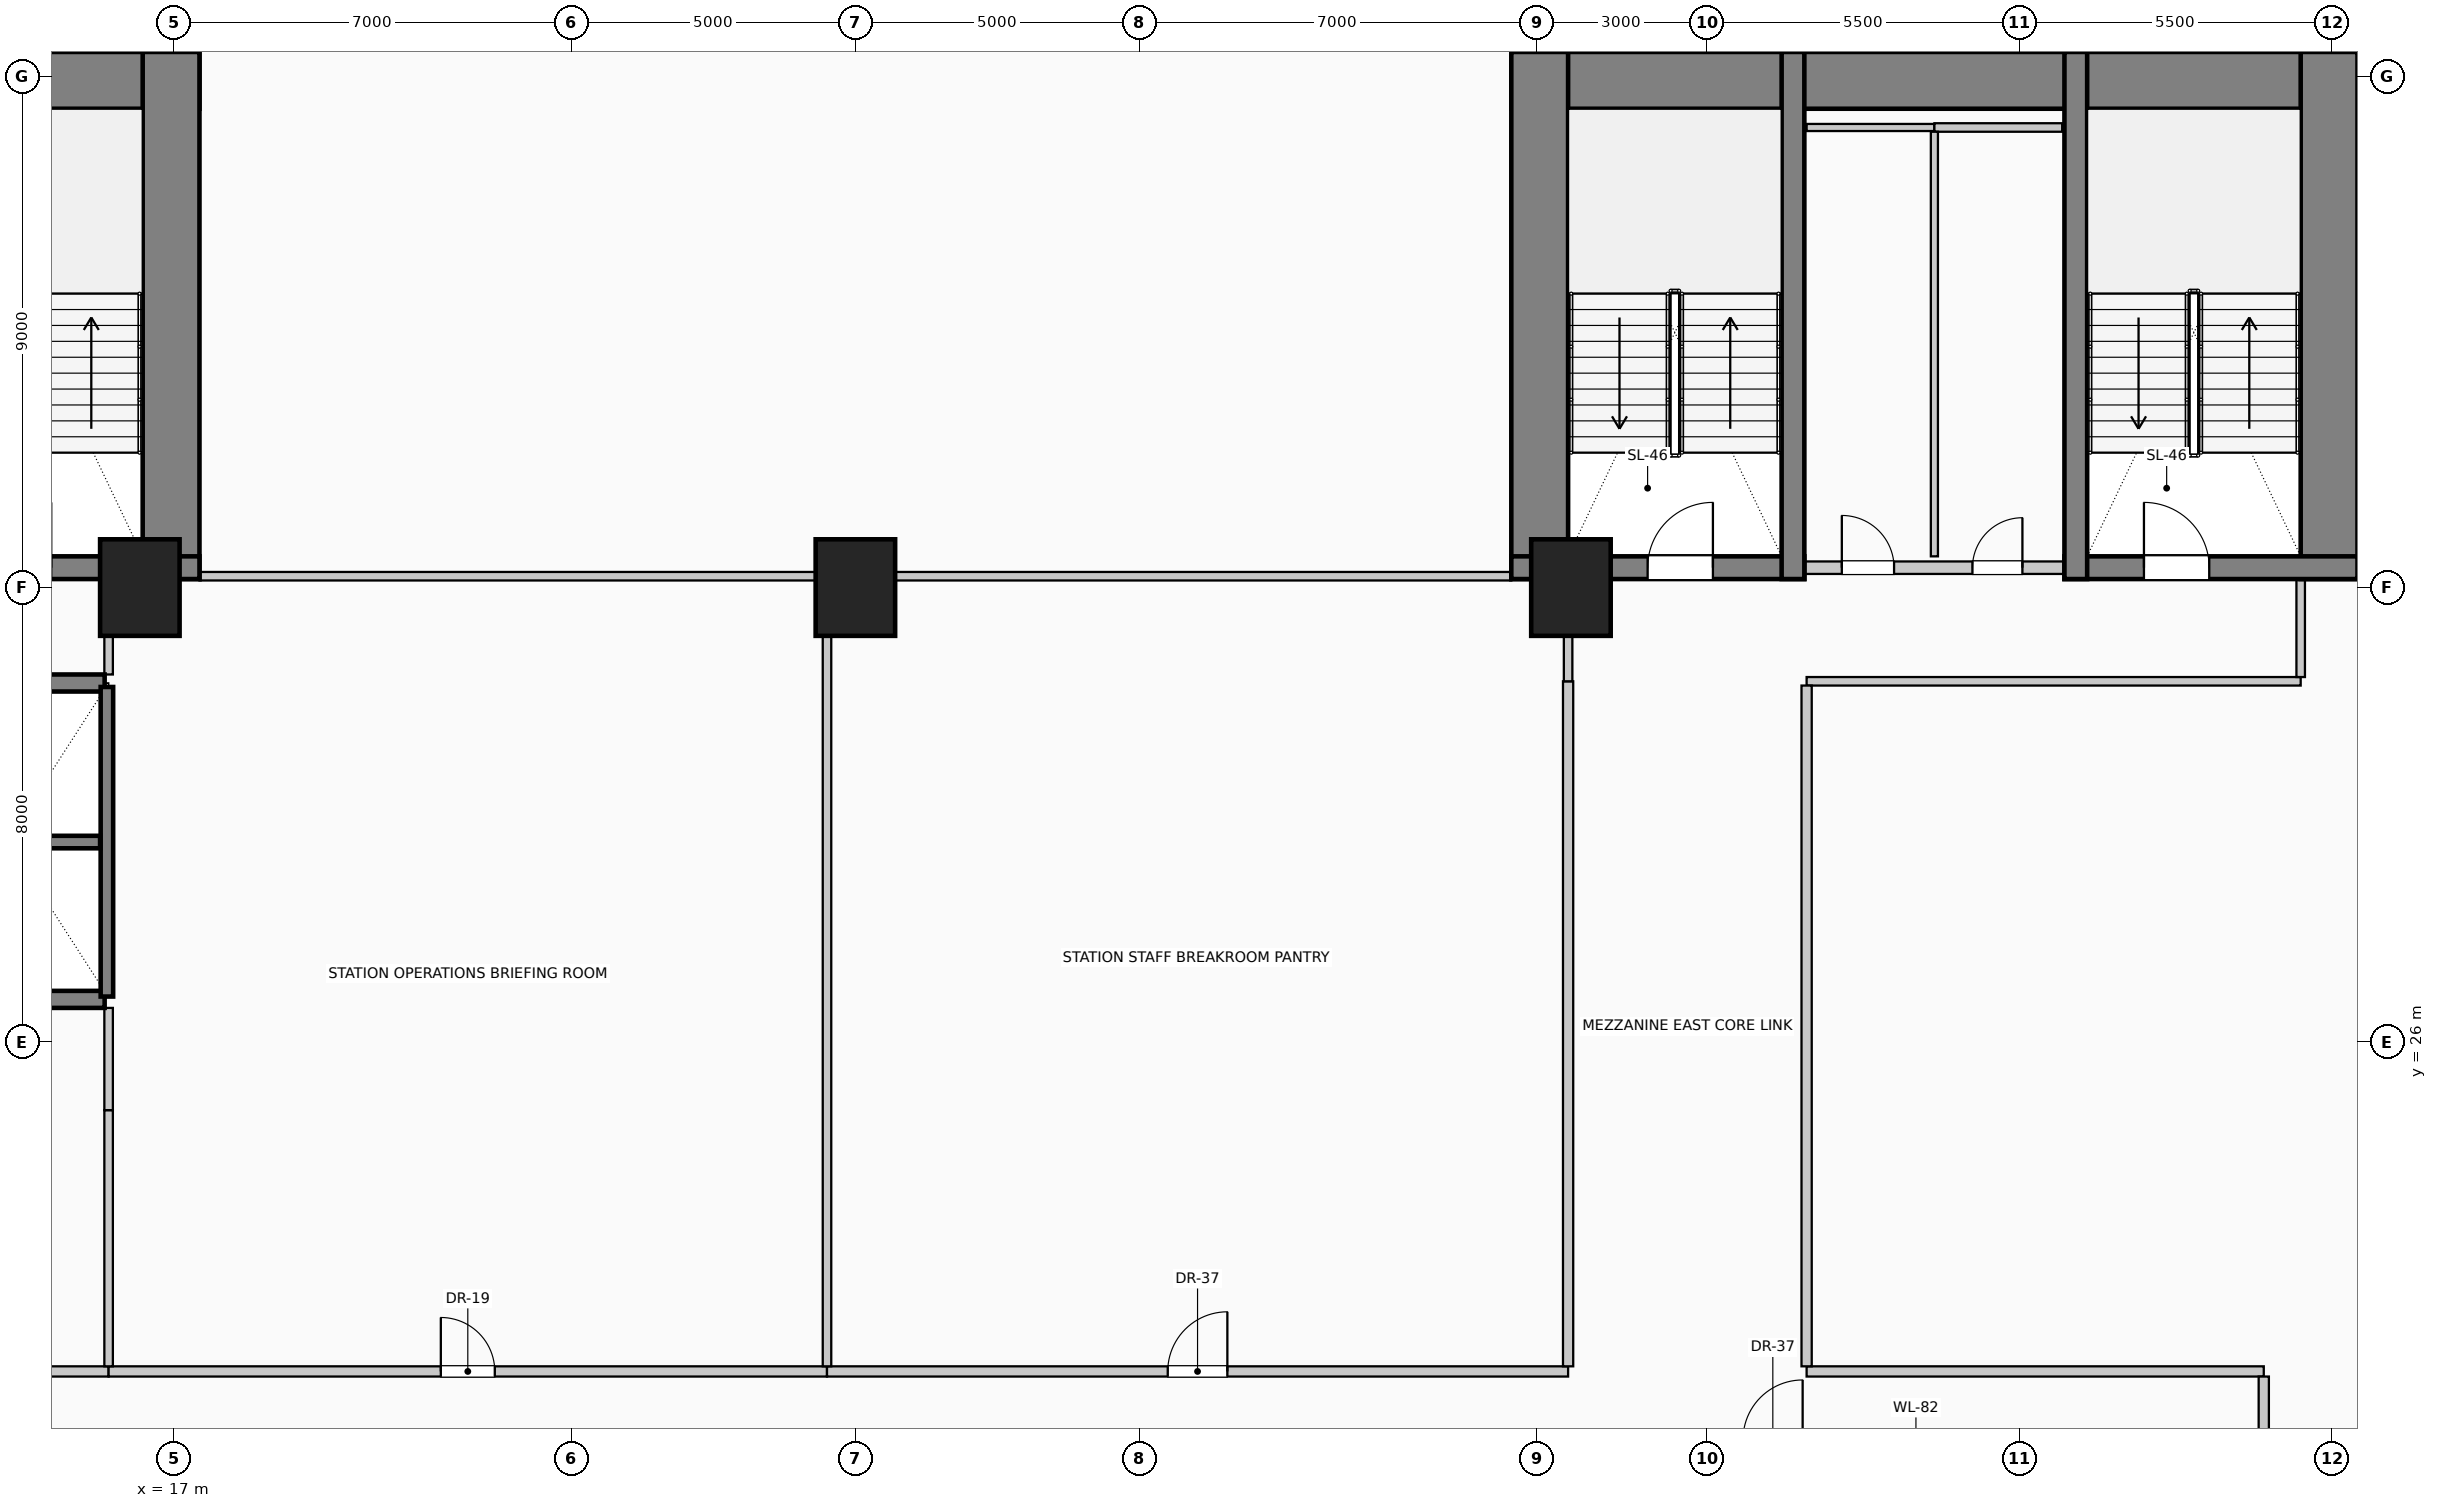
"""IFC4 building model, lengths in metres.
Left out: names, types, materials, properties, quantities, classifications, styles, units other than length and angle.
Written with IfcOpenShell. Run it as: python <this file> out.ifc"""

import sys

from ifc_helpers import new_model, si_unit, direction, frame, frame_2d, origin, origin_2d, place, context, subcontext, project, spatial, rectangle, extrude, element, fill, save


model = new_model("IFC4")
c1 = context("Model", 3, precision=1e-05, world=origin(), true_north=direction((0.0, 1.0)))
c2 = subcontext(c1, "Body", "Model", "MODEL_VIEW")
j1 = project(units=[si_unit("LENGTHUNIT", "METRE"), si_unit("PLANEANGLEUNIT", "RADIAN")], contexts=[c1])
p1 = place(None, origin())
s1 = spatial("IfcSite", under=j1, at=p1, CompositionType="ELEMENT")
p2 = place(p1, origin())
s2 = spatial("IfcBuilding", under=s1, at=p2, CompositionType="ELEMENT")
p3 = place(p2, frame((0.0, 0.0, 9.45)))
s3 = spatial("IfcBuildingStorey", under=s2, at=p3, CompositionType="ELEMENT", Elevation=9.45)
p4 = place(p3, frame((2.55, 42.93, 0.0), z_axis=(0.0, 0.0, 1.0), x_axis=(1.0, 0.0, 0.0)))
e1 = element("IfcWall", 1, at=p4, inside=s3, PredefinedType="SHEAR", context=c2, shape_type="SweptSolid", body=[
    extrude(rectangle(XDim=14.9, YDim=1.0, at=frame_2d((7.45, 0.0))), origin(), (0.0, 0.0, 1.0), 4.05),
])
p5 = place(p3, frame((16.95, 34.15, 0.0), z_axis=(0.0, 0.0, 1.0), x_axis=(0.0, 1.0, 0.0)))
e2 = element("IfcWall", 2, at=p5, inside=s3, PredefinedType="SHEAR", context=c2, shape_type="SweptSolid", body=[
    extrude(rectangle(XDim=9.28, YDim=1.0, at=frame_2d((4.64, 0.0))), origin(), (0.0, 0.0, 1.0), 4.05),
])
p6 = place(p3, frame((12.29, 34.35, 0.0), z_axis=(0.0, 0.0, 1.0), x_axis=(1.0, 0.0, 0.0)))
e3 = element("IfcWall", 3, at=p6, inside=s3, PredefinedType="SHEAR", context=c2, shape_type="SweptSolid", body=[
    extrude(rectangle(XDim=5.16, YDim=0.4, at=frame_2d((2.58, 0.0))), origin(), (0.0, 0.0, 1.0), 4.05),
])
p7 = place(p6, frame((1.4, 0.0, 0.0)))
e4 = element("IfcOpeningElement", 4, at=p7, cuts=e3, PredefinedType="OPENING", context=c2, shape_type="SweptSolid", body=[
    extrude(rectangle(XDim=1.15, YDim=2.2, at=frame_2d((0.575, 1.1))), frame((0.0, 0.21, 0.0), z_axis=(0.0, -1.0, 0.0), x_axis=(1.0, 0.0, 0.0)), (0.0, 0.0, 1.0), 0.42),
])
p8 = place(p3, frame((40.55, 42.93, 0.0), z_axis=(0.0, 0.0, 1.0), x_axis=(1.0, 0.0, 0.0)))
e5 = element("IfcWall", 5, at=p8, inside=s3, PredefinedType="SHEAR", context=c2, shape_type="SweptSolid", body=[
    extrude(rectangle(XDim=14.9, YDim=1.0, at=frame_2d((7.45, 0.0))), origin(), (0.0, 0.0, 1.0), 4.05),
])
for number, where, z_axis, x_axis in (
    (6, (41.05, 34.15, 0.0), (0.0, 0.0, 1.0), (0.0, 1.0, 0.0)),
    (7, (54.95, 34.15, 0.0), (0.0, 0.0, 1.0), (0.0, 1.0, 0.0)),
):
    element("IfcWall", number, at=place(p3, frame(where, z_axis=z_axis, x_axis=x_axis)), inside=s3, PredefinedType="SHEAR", context=c2, shape_type="SweptSolid", body=[
        extrude(rectangle(XDim=9.28, YDim=1.0, at=frame_2d((4.64, 0.0))), origin(), (0.0, 0.0, 1.0), 4.05),
    ])
p9 = place(p3, frame((40.55, 34.35, 0.0), z_axis=(0.0, 0.0, 1.0), x_axis=(1.0, 0.0, 0.0)))
e8 = element("IfcWall", 8, at=p9, inside=s3, PredefinedType="SHEAR", context=c2, shape_type="SweptSolid", body=[
    extrude(rectangle(XDim=5.16, YDim=0.4, at=frame_2d((2.58, 0.0))), origin(), (0.0, 0.0, 1.0), 4.05),
])
p10 = place(p9, frame((2.4, 0.0, 0.0)))
e9 = element("IfcOpeningElement", 9, at=p10, cuts=e8, PredefinedType="OPENING", context=c2, shape_type="SweptSolid", body=[
    extrude(rectangle(XDim=1.15, YDim=2.2, at=frame_2d((0.575, 1.1))), frame((0.0, 0.21, 0.0), z_axis=(0.0, -1.0, 0.0), x_axis=(1.0, 0.0, 0.0)), (0.0, 0.0, 1.0), 0.42),
])
p11 = place(p3, frame((45.51, 34.15, 0.0), z_axis=(0.0, 0.0, 1.0), x_axis=(0.0, 1.0, 0.0)))
e10 = element("IfcWall", 10, at=p11, inside=s3, PredefinedType="SHEAR", context=c2, shape_type="SweptSolid", body=[
    extrude(rectangle(XDim=9.28, YDim=0.4, at=frame_2d((4.64, 0.0))), origin(), (0.0, 0.0, 1.0), 4.05),
])
p12 = place(p3, frame((50.29, 34.35, 0.0), z_axis=(0.0, 0.0, 1.0), x_axis=(1.0, 0.0, 0.0)))
e11 = element("IfcWall", 11, at=p12, inside=s3, PredefinedType="SHEAR", context=c2, shape_type="SweptSolid", body=[
    extrude(rectangle(XDim=5.16, YDim=0.4, at=frame_2d((2.58, 0.0))), origin(), (0.0, 0.0, 1.0), 4.05),
])
p13 = place(p12, frame((1.4, 0.0, 0.0)))
e12 = element("IfcOpeningElement", 12, at=p13, cuts=e11, PredefinedType="OPENING", context=c2, shape_type="SweptSolid", body=[
    extrude(rectangle(XDim=1.15, YDim=2.2, at=frame_2d((0.575, 1.1))), frame((0.0, 0.21, 0.0), z_axis=(0.0, -1.0, 0.0), x_axis=(1.0, 0.0, 0.0)), (0.0, 0.0, 1.0), 0.42),
])
p14 = place(p3, frame((50.49, 34.15, 0.0), z_axis=(0.0, 0.0, 1.0), x_axis=(0.0, 1.0, 0.0)))
e13 = element("IfcWall", 13, at=p14, inside=s3, PredefinedType="SHEAR", context=c2, shape_type="SweptSolid", body=[
    extrude(rectangle(XDim=9.28, YDim=0.4, at=frame_2d((4.64, 0.0))), origin(), (0.0, 0.0, 1.0), 4.05),
])
for number, where, z_axis, x_axis in (
    (14, (16.4, 34.0, 0.0), (0.0, 0.0, 1.0), (1.0, 0.0, 0.0)),
    (15, (29.0, 34.0, 0.0), (0.0, 0.0, 1.0), (1.0, 0.0, 0.0)),
    (16, (41.6, 34.0, 0.0), (0.0, 0.0, 1.0), (1.0, 0.0, 0.0)),
):
    element("IfcColumn", number, at=place(p3, frame(where, z_axis=z_axis, x_axis=x_axis)), inside=s3, PredefinedType="COLUMN", context=c2, shape_type="SweptSolid", body=[
        extrude(rectangle(XDim=1.4, YDim=1.7, at=origin_2d()), origin(), (0.0, 0.0, 1.0), 4.05),
    ])
for number, where, z_axis, x_axis in (
    (17, (15.78, 26.75, 0.0), (0.0, 0.0, 1.0), (-1.0, 0.0, 0.0)),
    (18, (14.0, 32.32, 0.0), (0.0, 0.0, 1.0), (1.0, 0.0, 0.0)),
):
    element("IfcWall", number, at=place(p3, frame(where, z_axis=z_axis, x_axis=x_axis)), inside=s3, PredefinedType="SOLIDWALL", context=c2, shape_type="SweptSolid", body=[
        extrude(rectangle(XDim=1.78, YDim=0.3, at=frame_2d((0.89, 0.0))), origin(), (0.0, 0.0, 1.0), 4.05),
    ])
p15 = place(p3, frame((15.82, 26.8, 0.0), z_axis=(0.0, 0.0, 1.0), x_axis=(0.0, 1.0, 0.0)))
e19 = element("IfcWall", 19, at=p15, inside=s3, PredefinedType="SOLIDWALL", context=c2, shape_type="SweptSolid", body=[
    extrude(rectangle(XDim=5.45, YDim=0.22, at=frame_2d((2.725, 0.0))), origin(), (0.0, 0.0, 1.0), 4.05),
])
p16 = place(p3, frame((12.3, 29.52, 0.0), z_axis=(0.0, 0.0, 1.0), x_axis=(1.0, 0.0, 0.0)))
e20 = element("IfcWall", 20, at=p16, inside=s3, PredefinedType="SOLIDWALL", context=c2, shape_type="SweptSolid", body=[
    extrude(rectangle(XDim=3.4, YDim=0.22, at=frame_2d((1.7, 0.0))), origin(), (0.0, 0.0, 1.0), 4.05),
])
p17 = place(p3, frame((45.72, 34.35, 0.0), z_axis=(0.0, 0.0, 1.0), x_axis=(1.0, 0.0, 0.0)))
e21 = element("IfcWall", 21, at=p17, inside=s3, PredefinedType="PARTITIONING", context=c2, shape_type="SweptSolid", body=[
    extrude(rectangle(XDim=4.56, YDim=0.22, at=frame_2d((2.28, 0.0))), origin(), (0.0, 0.0, 1.0), 2.695),
])
p18 = place(p17, frame((0.65, 0.0, 0.0)))
e22 = element("IfcOpeningElement", 22, at=p18, cuts=e21, PredefinedType="OPENING", context=c2, shape_type="SweptSolid", body=[
    extrude(rectangle(XDim=0.92, YDim=2.1, at=frame_2d((0.46, 1.05))), frame((0.0, 0.12, 0.0), z_axis=(0.0, -1.0, 0.0), x_axis=(1.0, 0.0, 0.0)), (0.0, 0.0, 1.0), 0.24),
])
p19 = place(p17, frame((2.95, 0.0, 0.0)))
e23 = element("IfcOpeningElement", 23, at=p19, cuts=e21, PredefinedType="OPENING", context=c2, shape_type="SweptSolid", body=[
    extrude(rectangle(XDim=0.88, YDim=2.1, at=frame_2d((0.44, 1.05))), frame((0.0, 0.12, 0.0), z_axis=(0.0, -1.0, 0.0), x_axis=(1.0, 0.0, 0.0)), (0.0, 0.0, 1.0), 0.24),
])
p20 = place(p3, frame((12.2, 20.2, 0.0), z_axis=(0.0, 0.0, 1.0), x_axis=(1.0, 0.0, 0.0)))
e24 = element("IfcWall", 24, at=p20, inside=s3, PredefinedType="PARTITIONING", context=c2, shape_type="SweptSolid", body=[
    extrude(rectangle(XDim=3.65, YDim=0.18, at=frame_2d((1.825, 0.0))), origin(), (0.0, 0.0, 1.0), 3.65),
])
p21 = place(p3, frame((15.85, 20.2, 0.0), z_axis=(0.0, 0.0, 1.0), x_axis=(1.0, 0.0, 0.0)))
e25 = element("IfcWall", 25, at=p21, inside=s3, PredefinedType="PARTITIONING", context=c2, shape_type="SweptSolid", body=[
    extrude(rectangle(XDim=12.65, YDim=0.18, at=frame_2d((6.325, 0.0))), origin(), (0.0, 0.0, 1.0), 3.65),
])
p22 = place(p21, frame((5.85, 0.0, 0.0)))
e26 = element("IfcOpeningElement", 26, at=p22, cuts=e25, PredefinedType="OPENING", context=c2, shape_type="SweptSolid", body=[
    extrude(rectangle(XDim=0.95, YDim=2.15, at=frame_2d((0.475, 1.075))), frame((0.0, 0.1, 0.0), z_axis=(0.0, -1.0, 0.0), x_axis=(1.0, 0.0, 0.0)), (0.0, 0.0, 1.0), 0.2),
])
p23 = place(p3, frame((28.5, 20.2, 0.0), z_axis=(0.0, 0.0, 1.0), x_axis=(1.0, 0.0, 0.0)))
e27 = element("IfcWall", 27, at=p23, inside=s3, PredefinedType="PARTITIONING", context=c2, shape_type="SweptSolid", body=[
    extrude(rectangle(XDim=13.05, YDim=0.18, at=frame_2d((6.525, 0.0))), origin(), (0.0, 0.0, 1.0), 3.65),
])
p24 = place(p23, frame((6.0, 0.0, 0.0)))
e28 = element("IfcOpeningElement", 28, at=p24, cuts=e27, PredefinedType="OPENING", context=c2, shape_type="SweptSolid", body=[
    extrude(rectangle(XDim=1.05, YDim=2.15, at=frame_2d((0.525, 1.075))), frame((0.0, 0.1, 0.0), z_axis=(0.0, -1.0, 0.0), x_axis=(1.0, 0.0, 0.0)), (0.0, 0.0, 1.0), 0.2),
])
p25 = place(p3, frame((45.75, 20.2, 0.0), z_axis=(0.0, 0.0, 1.0), x_axis=(1.0, 0.0, 0.0)))
e29 = element("IfcWall", 29, at=p25, inside=s3, PredefinedType="PARTITIONING", context=c2, shape_type="SweptSolid", body=[
    extrude(rectangle(XDim=8.05, YDim=0.18, at=frame_2d((4.025, 0.0))), origin(), (0.0, 0.0, 1.0), 3.65),
])
p26 = place(p3, frame((45.75, 32.35, 0.0), z_axis=(0.0, 0.0, 1.0), x_axis=(1.0, 0.0, 0.0)))
e30 = element("IfcWall", 30, at=p26, inside=s3, PredefinedType="PARTITIONING", context=c2, shape_type="SweptSolid", body=[
    extrude(rectangle(XDim=8.7, YDim=0.15, at=frame_2d((4.35, 0.0))), origin(), (0.0, 0.0, 1.0), 3.65),
])
for number, where, z_axis, x_axis in (
    (31, (17.45, 34.2, 0.0), (0.0, 0.0, 1.0), (1.0, 0.0, 0.0)),
    (32, (29.7, 34.2, 0.0), (0.0, 0.0, 1.0), (1.0, 0.0, 0.0)),
):
    element("IfcWall", number, at=place(p3, frame(where, z_axis=z_axis, x_axis=x_axis)), inside=s3, PredefinedType="PARTITIONING", context=c2, shape_type="SweptSolid", body=[
        extrude(rectangle(XDim=10.85, YDim=0.15, at=frame_2d((5.425, 0.0))), origin(), (0.0, 0.0, 1.0), 2.695),
    ])
p27 = place(p3, frame((45.75, 42.1, 0.0), z_axis=(0.0, 0.0, 1.0), x_axis=(1.0, 0.0, 0.0)))
e33 = element("IfcWall", 33, at=p27, inside=s3, PredefinedType="PARTITIONING", context=c2, shape_type="SweptSolid", body=[
    extrude(rectangle(XDim=2.25, YDim=0.125, at=frame_2d((1.125, 0.0))), origin(), (0.0, 0.0, 1.0), 3.65),
])
p28 = place(p3, frame((48.0, 42.1, 0.0), z_axis=(0.0, 0.0, 1.0), x_axis=(1.0, 0.0, 0.0)))
e34 = element("IfcWall", 34, at=p28, inside=s3, PredefinedType="PARTITIONING", context=c2, shape_type="SweptSolid", body=[
    extrude(rectangle(XDim=2.25, YDim=0.15, at=frame_2d((1.125, 0.0))), origin(), (0.0, 0.0, 1.0), 3.65),
])
p29 = place(p3, frame((15.85, 20.29, 0.0), z_axis=(0.0, 0.0, 1.0), x_axis=(0.0, 1.0, 0.0)))
e35 = element("IfcWall", 35, at=p29, inside=s3, PredefinedType="PARTITIONING", context=c2, shape_type="SweptSolid", body=[
    extrude(rectangle(XDim=4.51, YDim=0.15, at=frame_2d((2.255, 0.0))), origin(), (0.0, 0.0, 1.0), 3.65),
])
p30 = place(p3, frame((15.85, 24.8, 0.0), z_axis=(0.0, 0.0, 1.0), x_axis=(0.0, 1.0, 0.0)))
e36 = element("IfcWall", 36, at=p30, inside=s3, PredefinedType="PARTITIONING", context=c2, shape_type="SweptSolid", body=[
    extrude(rectangle(XDim=1.8, YDim=0.15, at=frame_2d((0.9, 0.0))), origin(), (0.0, 0.0, 1.0), 3.65),
])
p31 = place(p3, frame((15.85, 32.47, 0.0), z_axis=(0.0, 0.0, 1.0), x_axis=(0.0, 1.0, 0.0)))
e37 = element("IfcWall", 37, at=p31, inside=s3, PredefinedType="PARTITIONING", context=c2, shape_type="SweptSolid", body=[
    extrude(rectangle(XDim=0.68, YDim=0.15, at=frame_2d((0.34, 0.0))), origin(), (0.0, 0.0, 1.0), 3.65),
])
p32 = place(p3, frame((28.5, 20.29, 0.0), z_axis=(0.0, 0.0, 1.0), x_axis=(0.0, 1.0, 0.0)))
e38 = element("IfcWall", 38, at=p32, inside=s3, PredefinedType="PARTITIONING", context=c2, shape_type="SweptSolid", body=[
    extrude(rectangle(XDim=12.86, YDim=0.15, at=frame_2d((6.43, 0.0))), origin(), (0.0, 0.0, 1.0), 3.65),
])
p33 = place(p3, frame((41.55, 20.29, 0.0), z_axis=(0.0, 0.0, 1.0), x_axis=(0.0, 1.0, 0.0)))
e39 = element("IfcWall", 39, at=p33, inside=s3, PredefinedType="PARTITIONING", context=c2, shape_type="SweptSolid", body=[
    extrude(rectangle(XDim=12.06, YDim=0.18, at=frame_2d((6.03, 0.0))), origin(), (0.0, 0.0, 1.0), 2.695),
])
p34 = place(p3, frame((41.55, 32.35, 0.0), z_axis=(0.0, 0.0, 1.0), x_axis=(0.0, 1.0, 0.0)))
e40 = element("IfcWall", 40, at=p34, inside=s3, PredefinedType="PARTITIONING", context=c2, shape_type="SweptSolid", body=[
    extrude(rectangle(XDim=0.8, YDim=0.15, at=frame_2d((0.4, 0.0))), origin(), (0.0, 0.0, 1.0), 2.695),
])
p35 = place(p3, frame((45.75, 20.29, 0.0), z_axis=(0.0, 0.0, 1.0), x_axis=(0.0, 1.0, 0.0)))
e41 = element("IfcWall", 41, at=p35, inside=s3, PredefinedType="PARTITIONING", context=c2, shape_type="SweptSolid", body=[
    extrude(rectangle(XDim=11.985, YDim=0.18, at=frame_2d((5.992, 0.0))), origin(), (0.0, 0.0, 1.0), 3.65),
])
p36 = place(p3, frame((48.0, 34.55, 0.0), z_axis=(0.0, 0.0, 1.0), x_axis=(0.0, 1.0, 0.0)))
e42 = element("IfcWall", 42, at=p36, inside=s3, PredefinedType="PARTITIONING", context=c2, shape_type="SweptSolid", body=[
    extrude(rectangle(XDim=7.475, YDim=0.125, at=frame_2d((3.737, 0.0))), origin(), (0.0, 0.0, 1.0), 3.65),
])
p37 = place(p3, frame((53.8, 19.09, 0.0), z_axis=(0.0, 0.0, 1.0), x_axis=(0.0, 1.0, 0.0)))
e43 = element("IfcWall", 43, at=p37, inside=s3, PredefinedType="PARTITIONING", context=c2, shape_type="SweptSolid", body=[
    extrude(rectangle(XDim=1.02, YDim=0.18, at=frame_2d((0.51, 0.0))), origin(), (0.0, 0.0, 1.0), 3.65),
])
p38 = place(p3, frame((54.45, 32.425, 0.0), z_axis=(0.0, 0.0, 1.0), x_axis=(0.0, 1.0, 0.0)))
e44 = element("IfcWall", 44, at=p38, inside=s3, PredefinedType="PARTITIONING", context=c2, shape_type="SweptSolid", body=[
    extrude(rectangle(XDim=1.725, YDim=0.15, at=frame_2d((0.862, 0.0))), origin(), (0.0, 0.0, 1.0), 3.65),
])
p39 = place(p10, origin())
e45 = element("IfcDoor", 45, at=p39, inside=s3, OperationType="SINGLE_SWING_RIGHT", PredefinedType="DOOR", context=c2, shape_type="SweptSolid", body=[
    extrude(rectangle(XDim=1.15, YDim=2.2, at=frame_2d((0.575, 1.1))), frame((0.0, 0.025, 0.0), z_axis=(0.0, -1.0, 0.0), x_axis=(1.0, 0.0, 0.0)), (0.0, 0.0, 1.0), 0.05),
])
fill(e9, e45)
p40 = place(p18, origin())
e46 = element("IfcDoor", 46, at=p40, inside=s3, OperationType="SINGLE_SWING_LEFT", PredefinedType="DOOR", context=c2, shape_type="SweptSolid", body=[
    extrude(rectangle(XDim=0.92, YDim=2.1, at=frame_2d((0.46, 1.05))), frame((0.0, 0.025, 0.0), z_axis=(0.0, -1.0, 0.0), x_axis=(1.0, 0.0, 0.0)), (0.0, 0.0, 1.0), 0.05),
])
fill(e22, e46)
p41 = place(p19, origin())
e47 = element("IfcDoor", 47, at=p41, inside=s3, OperationType="SINGLE_SWING_RIGHT", PredefinedType="DOOR", context=c2, shape_type="SweptSolid", body=[
    extrude(rectangle(XDim=0.88, YDim=2.1, at=frame_2d((0.44, 1.05))), frame((0.0, 0.025, 0.0), z_axis=(0.0, -1.0, 0.0), x_axis=(1.0, 0.0, 0.0)), (0.0, 0.0, 1.0), 0.05),
])
fill(e23, e47)
p42 = place(p13, origin())
e48 = element("IfcDoor", 48, at=p42, inside=s3, OperationType="SINGLE_SWING_LEFT", PredefinedType="DOOR", context=c2, shape_type="SweptSolid", body=[
    extrude(rectangle(XDim=1.15, YDim=2.2, at=frame_2d((0.575, 1.1))), frame((0.0, 0.025, 0.0), z_axis=(0.0, -1.0, 0.0), x_axis=(1.0, 0.0, 0.0)), (0.0, 0.0, 1.0), 0.05),
])
fill(e12, e48)
p43 = place(p22, origin())
e49 = element("IfcDoor", 49, at=p43, inside=s3, OperationType="SINGLE_SWING_LEFT", PredefinedType="DOOR", context=c2, shape_type="SweptSolid", body=[
    extrude(rectangle(XDim=0.95, YDim=2.15, at=frame_2d((0.475, 1.075))), frame((0.0, 0.025, 0.0), z_axis=(0.0, -1.0, 0.0), x_axis=(1.0, 0.0, 0.0)), (0.0, 0.0, 1.0), 0.05),
])
fill(e26, e49)
p44 = place(p24, origin())
e50 = element("IfcDoor", 50, at=p44, inside=s3, OperationType="SINGLE_SWING_RIGHT", PredefinedType="DOOR", context=c2, shape_type="SweptSolid", body=[
    extrude(rectangle(XDim=1.05, YDim=2.15, at=frame_2d((0.525, 1.075))), frame((0.0, 0.025, 0.0), z_axis=(0.0, -1.0, 0.0), x_axis=(1.0, 0.0, 0.0)), (0.0, 0.0, 1.0), 0.05),
])
fill(e28, e50)
save(model, sys.argv[1])
